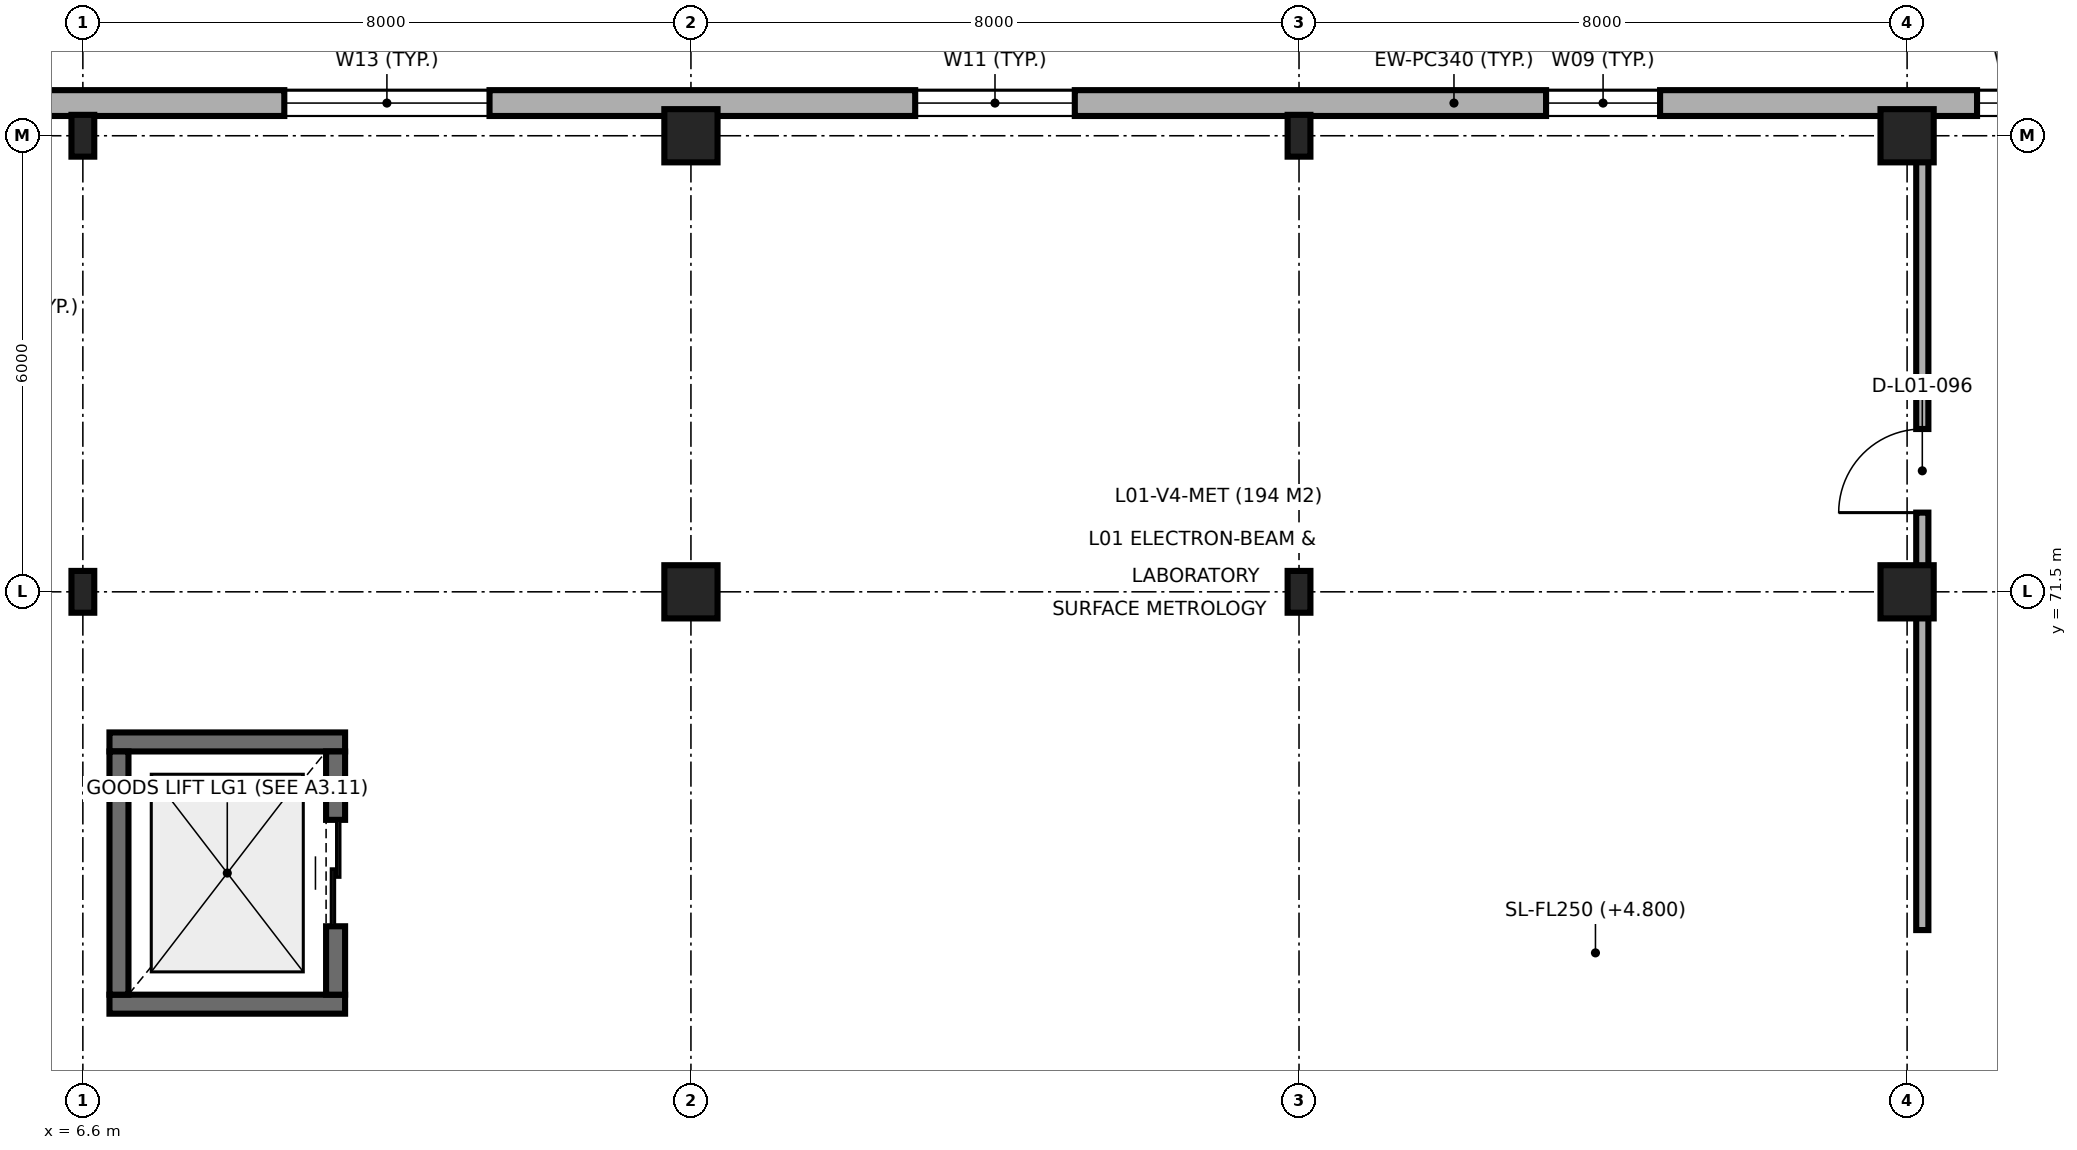
"""IFC4 building model, lengths in metres.
Left out: names, types, materials, properties, quantities, classifications, styles, units other than length and angle.
Written with IfcOpenShell. Run it as: python <this file> out.ifc"""

import sys

from ifc_helpers import new_model, si_unit, direction, frame, frame_2d, origin, origin_2d, place, context, subcontext, project, spatial, rectangle, i_section, extrude, element, fill, save


model = new_model("IFC4")
c1 = context("Model", 3, precision=1e-05, world=origin(), true_north=direction((0.0, 1.0)))
c2 = subcontext(c1, "Body", "Model", "MODEL_VIEW")
j1 = project(units=[si_unit("LENGTHUNIT", "METRE"), si_unit("PLANEANGLEUNIT", "RADIAN")], contexts=[c1])
p1 = place(None, origin())
s1 = spatial("IfcSite", under=j1, at=p1, CompositionType="ELEMENT")
p2 = place(p1, origin())
s2 = spatial("IfcBuilding", under=s1, at=p2, CompositionType="ELEMENT")
p3 = place(p2, frame((0.0, 0.0, 4.8)))
s3 = spatial("IfcBuildingStorey", under=s2, at=p3, CompositionType="ELEMENT", Elevation=4.8)
for number, where, z_axis, x_axis in (
    (1, (6.6, 71.5, 0.0), (0.0, 0.0, 1.0), (1.0, 0.0, 0.0)),
    (2, (6.6, 77.5, 0.0), (0.0, 0.0, 1.0), (1.0, 0.0, 0.0)),
):
    element("IfcColumn", number, at=place(p3, frame(where, z_axis=z_axis, x_axis=x_axis)), inside=s3, PredefinedType="COLUMN", context=c2, shape_type="SweptSolid", body=[
        extrude(i_section(OverallWidth=0.3, OverallDepth=0.55, WebThickness=0.015, FlangeThickness=0.029, FilletRadius=0.027, at=origin_2d()), origin(), (0.0, 0.0, 1.0), 4.5),
    ])
for number, where, z_axis, x_axis in (
    (3, (14.6, 71.5, 0.0), (0.0, 0.0, 1.0), (1.0, 0.0, 0.0)),
    (4, (14.6, 77.5, 0.0), (0.0, 0.0, 1.0), (1.0, 0.0, 0.0)),
):
    element("IfcColumn", number, at=place(p3, frame(where, z_axis=z_axis, x_axis=x_axis)), inside=s3, PredefinedType="COLUMN", context=c2, shape_type="SweptSolid", body=[
        extrude(rectangle(XDim=0.7, YDim=0.7, at=origin_2d()), origin(), (0.0, 0.0, 1.0), 4.5),
    ])
for number, where, z_axis, x_axis in (
    (5, (22.6, 71.5, 0.0), (0.0, 0.0, 1.0), (1.0, 0.0, 0.0)),
    (6, (22.6, 77.5, 0.0), (0.0, 0.0, 1.0), (1.0, 0.0, 0.0)),
):
    element("IfcColumn", number, at=place(p3, frame(where, z_axis=z_axis, x_axis=x_axis)), inside=s3, PredefinedType="COLUMN", context=c2, shape_type="SweptSolid", body=[
        extrude(i_section(OverallWidth=0.3, OverallDepth=0.55, WebThickness=0.015, FlangeThickness=0.029, FilletRadius=0.027, at=origin_2d()), origin(), (0.0, 0.0, 1.0), 4.5),
    ])
for number, where, z_axis, x_axis in (
    (7, (30.6, 71.5, 0.0), (0.0, 0.0, 1.0), (1.0, 0.0, 0.0)),
    (8, (30.6, 77.5, 0.0), (0.0, 0.0, 1.0), (1.0, 0.0, 0.0)),
):
    element("IfcColumn", number, at=place(p3, frame(where, z_axis=z_axis, x_axis=x_axis)), inside=s3, PredefinedType="COLUMN", context=c2, shape_type="SweptSolid", body=[
        extrude(rectangle(XDim=0.7, YDim=0.7, at=origin_2d()), origin(), (0.0, 0.0, 1.0), 4.5),
    ])
for number, where, z_axis, x_axis in (
    (9, (6.95, 66.075, 0.0), (0.0, 0.0, 1.0), (1.0, 0.0, 0.0)),
    (10, (10.05, 69.525, 0.0), (0.0, 0.0, 1.0), (-1.0, 0.0, 0.0)),
):
    element("IfcWall", number, at=place(p3, frame(where, z_axis=z_axis, x_axis=x_axis)), inside=s3, PredefinedType="SHEAR", context=c2, shape_type="SweptSolid", body=[
        extrude(rectangle(XDim=3.1, YDim=0.25, at=frame_2d((1.55, 0.0))), origin(), (0.0, 0.0, 1.0), 4.5),
    ])
p4 = place(p3, frame((7.075, 69.4, 0.0), z_axis=(0.0, 0.0, 1.0), x_axis=(0.0, -1.0, 0.0)))
e11 = element("IfcWall", 11, at=p4, inside=s3, PredefinedType="SHEAR", context=c2, shape_type="SweptSolid", body=[
    extrude(rectangle(XDim=3.2, YDim=0.25, at=frame_2d((1.6, 0.0))), origin(), (0.0, 0.0, 1.0), 4.5),
])
p5 = place(p3, frame((9.925, 66.2, 0.0), z_axis=(0.0, 0.0, 1.0), x_axis=(0.0, 1.0, 0.0)))
e12 = element("IfcWall", 12, at=p5, inside=s3, PredefinedType="SHEAR", context=c2, shape_type="SweptSolid", body=[
    extrude(rectangle(XDim=3.2, YDim=0.25, at=frame_2d((1.6, 0.0))), origin(), (0.0, 0.0, 1.0), 4.5),
])
p6 = place(p5, frame((0.9, 0.0, 0.0)))
e13 = element("IfcOpeningElement", 13, at=p6, cuts=e12, PredefinedType="OPENING", context=c2, shape_type="SweptSolid", body=[
    extrude(rectangle(XDim=1.4, YDim=2.2, at=frame_2d((0.7, 1.1))), frame((0.0, 0.135, 0.0), z_axis=(0.0, -1.0, 0.0), x_axis=(1.0, 0.0, 0.0)), (0.0, 0.0, 1.0), 0.27),
])
p7 = place(p3, frame((43.677, 77.93, 0.0), z_axis=(0.0, 0.0, 1.0), x_axis=(-1.0, 0.0, 0.0)))
e14 = element("IfcWall", 14, at=p7, inside=s3, PredefinedType="SOLIDWALL", context=c2, shape_type="SweptSolid", body=[
    extrude(rectangle(XDim=38.077, YDim=0.34, at=frame_2d((19.039, 0.0))), origin(), (0.0, 0.0, 1.0), 4.25),
])
p8 = place(p7, frame((6.277, 0.0, 0.0)))
e15 = element("IfcOpeningElement", 15, at=p8, cuts=e14, PredefinedType="OPENING", context=c2, shape_type="SweptSolid", body=[
    extrude(rectangle(XDim=1.6, YDim=2.2, at=frame_2d((0.8, 1.1))), frame((0.0, 0.18, 0.0), z_axis=(0.0, -1.0, 0.0), x_axis=(1.0, 0.0, 0.0)), (0.0, 0.0, 1.0), 0.36),
])
p9 = place(p7, frame((1.389, 0.0, 0.9)))
e16 = element("IfcOpeningElement", 16, at=p9, cuts=e14, PredefinedType="OPENING", context=c2, shape_type="SweptSolid", body=[
    extrude(rectangle(XDim=2.4, YDim=1.8, at=frame_2d((1.2, 0.9))), frame((0.0, 0.18, 0.0), z_axis=(0.0, -1.0, 0.0), x_axis=(1.0, 0.0, 0.0)), (0.0, 0.0, 1.0), 0.36),
])
p10 = place(p7, frame((10.357, 0.0, 0.9)))
e17 = element("IfcOpeningElement", 17, at=p10, cuts=e14, PredefinedType="OPENING", context=c2, shape_type="SweptSolid", body=[
    extrude(rectangle(XDim=1.8, YDim=2.1, at=frame_2d((0.9, 1.05))), frame((0.0, 0.18, 0.0), z_axis=(0.0, -1.0, 0.0), x_axis=(1.0, 0.0, 0.0)), (0.0, 0.0, 1.0), 0.36),
])
p11 = place(p7, frame((16.327, 0.0, 0.9)))
e18 = element("IfcOpeningElement", 18, at=p11, cuts=e14, PredefinedType="OPENING", context=c2, shape_type="SweptSolid", body=[
    extrude(rectangle(XDim=1.5, YDim=2.1, at=frame_2d((0.75, 1.05))), frame((0.0, 0.18, 0.0), z_axis=(0.0, -1.0, 0.0), x_axis=(1.0, 0.0, 0.0)), (0.0, 0.0, 1.0), 0.36),
])
p12 = place(p7, frame((24.027, 0.0, 0.9)))
e19 = element("IfcOpeningElement", 19, at=p12, cuts=e14, PredefinedType="OPENING", context=c2, shape_type="SweptSolid", body=[
    extrude(rectangle(XDim=2.1, YDim=2.1, at=frame_2d((1.05, 1.05))), frame((0.0, 0.18, 0.0), z_axis=(0.0, -1.0, 0.0), x_axis=(1.0, 0.0, 0.0)), (0.0, 0.0, 1.0), 0.36),
])
p13 = place(p7, frame((31.727, 0.0, 0.9)))
e20 = element("IfcOpeningElement", 20, at=p13, cuts=e14, PredefinedType="OPENING", context=c2, shape_type="SweptSolid", body=[
    extrude(rectangle(XDim=2.7, YDim=2.1, at=frame_2d((1.35, 1.05))), frame((0.0, 0.18, 0.0), z_axis=(0.0, -1.0, 0.0), x_axis=(1.0, 0.0, 0.0)), (0.0, 0.0, 1.0), 0.36),
])
p14 = place(p3, frame((30.8, 67.05, 0.0), z_axis=(0.0, 0.0, 1.0), x_axis=(0.0, 1.0, 0.0)))
e21 = element("IfcWall", 21, at=p14, inside=s3, PredefinedType="PARTITIONING", context=c2, shape_type="SweptSolid", body=[
    extrude(rectangle(XDim=4.2, YDim=0.16, at=frame_2d((2.1, 0.0))), origin(), (0.0, 0.0, 1.0), 3.85),
])
p15 = place(p3, frame((30.8, 71.75, 0.0), z_axis=(0.0, 0.0, 1.0), x_axis=(0.0, 1.0, 0.0)))
e22 = element("IfcWall", 22, at=p15, inside=s3, PredefinedType="PARTITIONING", context=c2, shape_type="SweptSolid", body=[
    extrude(rectangle(XDim=5.5, YDim=0.16, at=frame_2d((2.75, 0.0))), origin(), (0.0, 0.0, 1.0), 3.85),
])
p16 = place(p15, frame((0.792, 0.0, 0.0)))
e23 = element("IfcOpeningElement", 23, at=p16, cuts=e22, PredefinedType="OPENING", context=c2, shape_type="SweptSolid", body=[
    extrude(rectangle(XDim=1.1, YDim=2.15, at=frame_2d((0.55, 1.075))), frame((0.0, 0.09, 0.0), z_axis=(0.0, -1.0, 0.0), x_axis=(1.0, 0.0, 0.0)), (0.0, 0.0, 1.0), 0.18),
])
p17 = place(p6, origin())
e24 = element("IfcDoor", 24, at=p17, inside=s3, OperationType="DOUBLE_DOOR_SLIDING", PredefinedType="DOOR", context=c2, shape_type="SweptSolid", body=[
    extrude(rectangle(XDim=1.4, YDim=2.2, at=frame_2d((0.7, 1.1))), frame((0.0, 0.025, 0.0), z_axis=(0.0, -1.0, 0.0), x_axis=(1.0, 0.0, 0.0)), (0.0, 0.0, 1.0), 0.05),
])
fill(e13, e24)
p18 = place(p10, origin())
e25 = element("IfcWindow", 25, at=p18, inside=s3, PartitioningType="SINGLE_PANEL", PredefinedType="WINDOW", context=c2, shape_type="SweptSolid", body=[
    extrude(rectangle(XDim=1.8, YDim=2.1, at=frame_2d((0.9, 1.05))), frame((0.0, 0.03, 0.0), z_axis=(0.0, -1.0, 0.0), x_axis=(1.0, 0.0, 0.0)), (0.0, 0.0, 1.0), 0.06),
])
fill(e17, e25)
p19 = place(p11, origin())
e26 = element("IfcWindow", 26, at=p19, inside=s3, PartitioningType="SINGLE_PANEL", PredefinedType="WINDOW", context=c2, shape_type="SweptSolid", body=[
    extrude(rectangle(XDim=1.5, YDim=2.1, at=frame_2d((0.75, 1.05))), frame((0.0, 0.03, 0.0), z_axis=(0.0, -1.0, 0.0), x_axis=(1.0, 0.0, 0.0)), (0.0, 0.0, 1.0), 0.06),
])
fill(e18, e26)
p20 = place(p12, origin())
e27 = element("IfcWindow", 27, at=p20, inside=s3, PartitioningType="SINGLE_PANEL", PredefinedType="WINDOW", context=c2, shape_type="SweptSolid", body=[
    extrude(rectangle(XDim=2.1, YDim=2.1, at=frame_2d((1.05, 1.05))), frame((0.0, 0.03, 0.0), z_axis=(0.0, -1.0, 0.0), x_axis=(1.0, 0.0, 0.0)), (0.0, 0.0, 1.0), 0.06),
])
fill(e19, e27)
p21 = place(p13, origin())
e28 = element("IfcWindow", 28, at=p21, inside=s3, PartitioningType="SINGLE_PANEL", PredefinedType="WINDOW", context=c2, shape_type="SweptSolid", body=[
    extrude(rectangle(XDim=2.7, YDim=2.1, at=frame_2d((1.35, 1.05))), frame((0.0, 0.03, 0.0), z_axis=(0.0, -1.0, 0.0), x_axis=(1.0, 0.0, 0.0)), (0.0, 0.0, 1.0), 0.06),
])
fill(e20, e28)
p22 = place(p16, origin())
e29 = element("IfcDoor", 29, at=p22, inside=s3, OperationType="SINGLE_SWING_LEFT", PredefinedType="DOOR", context=c2, shape_type="SweptSolid", body=[
    extrude(rectangle(XDim=1.1, YDim=2.15, at=frame_2d((0.55, 1.075))), frame((0.0, 0.025, 0.0), z_axis=(0.0, -1.0, 0.0), x_axis=(1.0, 0.0, 0.0)), (0.0, 0.0, 1.0), 0.05),
])
fill(e23, e29)
save(model, sys.argv[1])
